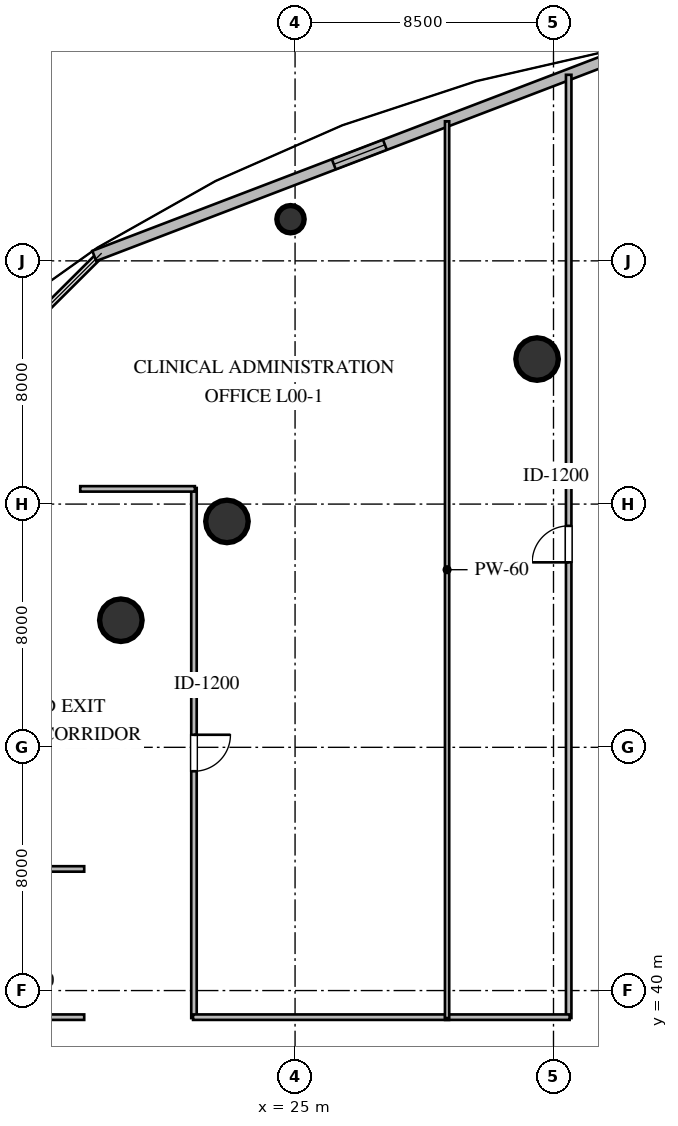
"""IFC4 building model, lengths in metres.
Left out: names, types, materials, properties, quantities, classifications, styles, units other than length and angle.
Written with IfcOpenShell. Run it as: python <this file> out.ifc"""

import sys

from ifc_helpers import new_model, si_unit, direction, frame, frame_2d, origin, origin_2d, place, context, subcontext, project, spatial, rectangle, circle, extrude, element, fill, save


model = new_model("IFC4")
c1 = context("Model", 3, precision=1e-05, world=origin(), true_north=direction((0.0, 1.0)))
c2 = subcontext(c1, "Body", "Model", "MODEL_VIEW")
j1 = project(units=[si_unit("LENGTHUNIT", "METRE"), si_unit("PLANEANGLEUNIT", "RADIAN")], contexts=[c1])
p1 = place(None, origin())
s1 = spatial("IfcSite", under=j1, at=p1, CompositionType="ELEMENT")
p2 = place(p1, origin())
s2 = spatial("IfcBuilding", under=s1, at=p2, CompositionType="ELEMENT")
p3 = place(p2, origin())
s3 = spatial("IfcBuildingStorey", under=s2, at=p3, CompositionType="ELEMENT", Elevation=0.0)
for number, where, z_axis, x_axis in (
    (1, (32.96, 60.77, 0.0), (0.0, 0.0, 1.0), (1.0, 0.0, 0.0)),
    (2, (22.76, 55.43, 0.0), (0.0, 0.0, 1.0), (1.0, 0.0, 0.0)),
    (3, (19.27, 52.18, 0.0), (0.0, 0.0, 1.0), (1.0, 0.0, 0.0)),
):
    element("IfcColumn", number, at=place(p3, frame(where, z_axis=z_axis, x_axis=x_axis)), inside=s3, PredefinedType="COLUMN", context=c2, shape_type="SweptSolid", body=[
        extrude(circle(Radius=0.7, at=origin_2d()), origin(), (0.0, 0.0, 1.0), 4.8),
    ])
p4 = place(p3, frame((24.85, 65.37, 0.0), z_axis=(0.0, 0.0, 1.0), x_axis=(1.0, 0.0, 0.0)))
e4 = element("IfcColumn", 4, at=p4, inside=s3, PredefinedType="COLUMN", context=c2, shape_type="SweptSolid", body=[
    extrude(circle(Radius=0.45, at=origin_2d()), origin(), (0.0, 0.0, 1.0), 4.8),
])
p5 = place(p3, frame((35.835, 70.831, 0.0), z_axis=(0.0, 0.0, 1.0), x_axis=(-0.934010262022, -0.357246176238, 0.0)))
e5 = element("IfcWall", 5, at=p5, inside=s3, PredefinedType="STANDARD", context=c2, shape_type="SweptSolid", body=[
    extrude(rectangle(XDim=18.671, YDim=0.36, at=frame_2d((9.335, 0.0))), origin(), (0.0, 0.0, 1.0), 4.52),
])
p6 = place(p5, frame((8.436, 0.0, 1.05)))
e6 = element("IfcOpeningElement", 6, at=p6, cuts=e5, PredefinedType="OPENING", context=c2, shape_type="SweptSolid", body=[
    extrude(rectangle(XDim=1.8, YDim=1.7, at=frame_2d((0.9, 0.85))), frame((0.0, 0.19, 0.0), z_axis=(0.0, -1.0, 0.0), x_axis=(1.0, 0.0, 0.0)), (0.0, 0.0, 1.0), 0.38),
])
p7 = place(p3, frame((18.065, 44.0, 0.0), z_axis=(0.0, 0.0, 1.0), x_axis=(-1.0, 0.0, 0.0)))
e7 = element("IfcWall", 7, at=p7, inside=s3, PredefinedType="PARTITIONING", context=c2, shape_type="SweptSolid", body=[
    extrude(rectangle(XDim=13.611, YDim=0.18, at=frame_2d((6.805, 0.0))), origin(), (0.0, 0.0, 1.0), 4.52),
])
p8 = place(p7, frame((6.286, 0.0, 0.0)))
e8 = element("IfcOpeningElement", 8, at=p8, cuts=e7, PredefinedType="OPENING", context=c2, shape_type="SweptSolid", body=[
    extrude(rectangle(XDim=1.2, YDim=2.15, at=frame_2d((0.6, 1.075))), frame((0.0, 0.1, 0.0), z_axis=(0.0, -1.0, 0.0), x_axis=(1.0, 0.0, 0.0)), (0.0, 0.0, 1.0), 0.2),
])
p9 = place(p3, frame((13.97, 39.125, 0.0), z_axis=(0.0, 0.0, 1.0), x_axis=(1.0, 0.0, 0.0)))
e9 = element("IfcWall", 9, at=p9, inside=s3, PredefinedType="PARTITIONING", context=c2, shape_type="SweptSolid", body=[
    extrude(rectangle(XDim=4.095, YDim=0.18, at=frame_2d((2.047, 0.0))), origin(), (0.0, 0.0, 1.0), 4.52),
])
p10 = place(p3, frame((21.675, 56.53, 0.0), z_axis=(0.0, 0.0, 1.0), x_axis=(0.0, -1.0, 0.0)))
e10 = element("IfcWall", 10, at=p10, inside=s3, PredefinedType="PARTITIONING", context=c2, shape_type="SweptSolid", body=[
    extrude(rectangle(XDim=17.435, YDim=0.18, at=frame_2d((8.718, 0.0))), origin(), (0.0, 0.0, 1.0), 3.966),
])
p11 = place(p10, frame((8.117, 0.0, 0.0)))
e11 = element("IfcOpeningElement", 11, at=p11, cuts=e10, PredefinedType="OPENING", context=c2, shape_type="SweptSolid", body=[
    extrude(rectangle(XDim=1.2, YDim=2.15, at=frame_2d((0.6, 1.075))), frame((0.0, 0.1, 0.0), z_axis=(0.0, -1.0, 0.0), x_axis=(1.0, 0.0, 0.0)), (0.0, 0.0, 1.0), 0.2),
])
p12 = place(p3, frame((21.645, 39.125, 0.0), z_axis=(0.0, 0.0, 1.0), x_axis=(1.0, 0.0, 0.0)))
e12 = element("IfcWall", 12, at=p12, inside=s3, PredefinedType="PARTITIONING", context=c2, shape_type="SweptSolid", body=[
    extrude(rectangle(XDim=8.42, YDim=0.18, at=frame_2d((4.21, 0.0))), origin(), (0.0, 0.0, 1.0), 4.52),
])
p13 = place(p3, frame((17.935, 56.5, 0.0), z_axis=(0.0, 0.0, 1.0), x_axis=(1.0, 0.0, 0.0)))
e13 = element("IfcWall", 13, at=p13, inside=s3, PredefinedType="PARTITIONING", context=c2, shape_type="SweptSolid", body=[
    extrude(rectangle(XDim=3.77, YDim=0.18, at=frame_2d((1.885, 0.0))), origin(), (0.0, 0.0, 1.0), 4.52),
])
p14 = place(p3, frame((34.0, 39.095, 0.0), z_axis=(0.0, 0.0, 1.0), x_axis=(0.0, 1.0, 0.0)))
e14 = element("IfcWall", 14, at=p14, inside=s3, PredefinedType="PARTITIONING", context=c2, shape_type="SweptSolid", body=[
    extrude(rectangle(XDim=31.024, YDim=0.18, at=frame_2d((15.512, 0.0))), origin(), (0.0, 0.0, 1.0), 4.52),
])
p15 = place(p14, frame((14.989, 0.0, 0.0)))
e15 = element("IfcOpeningElement", 15, at=p15, cuts=e14, PredefinedType="OPENING", context=c2, shape_type="SweptSolid", body=[
    extrude(rectangle(XDim=1.2, YDim=2.15, at=frame_2d((0.6, 1.075))), frame((0.0, 0.1, 0.0), z_axis=(0.0, -1.0, 0.0), x_axis=(1.0, 0.0, 0.0)), (0.0, 0.0, 1.0), 0.2),
])
p16 = place(p3, frame((29.935, 39.125, 0.0), z_axis=(0.0, 0.0, 1.0), x_axis=(1.0, 0.0, 0.0)))
e16 = element("IfcWall", 16, at=p16, inside=s3, PredefinedType="PARTITIONING", context=c2, shape_type="SweptSolid", body=[
    extrude(rectangle(XDim=4.095, YDim=0.18, at=frame_2d((2.047, 0.0))), origin(), (0.0, 0.0, 1.0), 4.52),
])
p17 = place(p3, frame((30.0, 68.589, 0.0), z_axis=(0.0, 0.0, 1.0), x_axis=(0.0, -1.0, 0.0)))
e17 = element("IfcWall", 17, at=p17, inside=s3, PredefinedType="PARTITIONING", context=c2, shape_type="SweptSolid", body=[
    extrude(rectangle(XDim=29.494, YDim=0.14, at=frame_2d((14.747, 0.0))), origin(), (0.0, 0.0, 1.0), 3.966),
])
p18 = place(p6, origin())
e18 = element("IfcWindow", 18, at=p18, inside=s3, PartitioningType="SINGLE_PANEL", PredefinedType="WINDOW", context=c2, shape_type="SweptSolid", body=[
    extrude(rectangle(XDim=1.8, YDim=1.7, at=frame_2d((0.9, 0.85))), frame((0.0, 0.03, 0.0), z_axis=(0.0, -1.0, 0.0), x_axis=(1.0, 0.0, 0.0)), (0.0, 0.0, 1.0), 0.06),
])
fill(e6, e18)
p19 = place(p11, origin())
e19 = element("IfcDoor", 19, at=p19, inside=s3, OperationType="SINGLE_SWING_LEFT", PredefinedType="DOOR", context=c2, shape_type="SweptSolid", body=[
    extrude(rectangle(XDim=1.2, YDim=2.15, at=frame_2d((0.6, 1.075))), frame((0.0, 0.025, 0.0), z_axis=(0.0, -1.0, 0.0), x_axis=(1.0, 0.0, 0.0)), (0.0, 0.0, 1.0), 0.05),
])
fill(e11, e19)
p20 = place(p15, origin())
e20 = element("IfcDoor", 20, at=p20, inside=s3, OperationType="SINGLE_SWING_LEFT", PredefinedType="DOOR", context=c2, shape_type="SweptSolid", body=[
    extrude(rectangle(XDim=1.2, YDim=2.15, at=frame_2d((0.6, 1.075))), frame((0.0, 0.025, 0.0), z_axis=(0.0, -1.0, 0.0), x_axis=(1.0, 0.0, 0.0)), (0.0, 0.0, 1.0), 0.05),
])
fill(e15, e20)
save(model, sys.argv[1])
